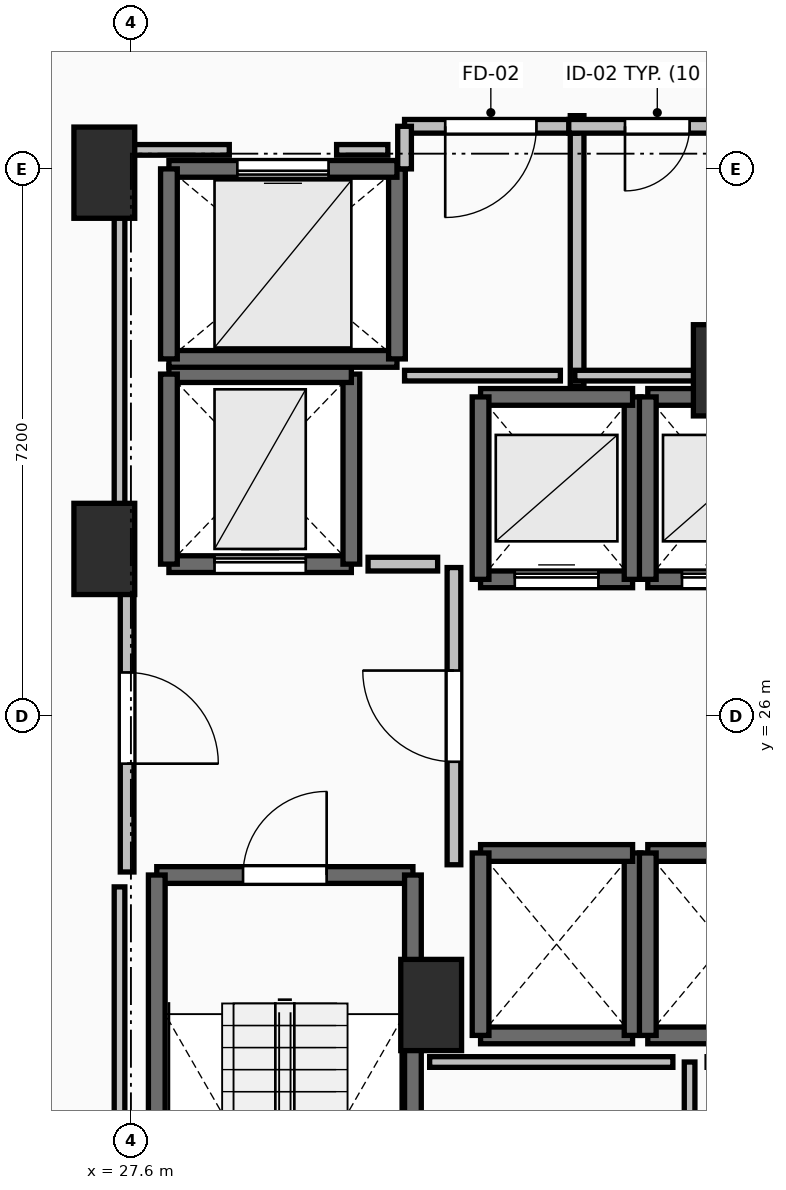
"""IFC4 building model, lengths in metres.
Left out: names, types, materials, properties, quantities, classifications, styles, units other than length and angle.
Written with IfcOpenShell. Run it as: python <this file> out.ifc"""

import sys

from ifc_helpers import new_model, si_unit, direction, frame, frame_2d, origin, origin_2d, place, context, subcontext, project, spatial, rectangle, extrude, element, fill, save


model = new_model("IFC4")
c1 = context("Model", 3, precision=1e-05, world=origin(), true_north=direction((0.0, 1.0)))
c2 = subcontext(c1, "Body", "Model", "MODEL_VIEW")
j1 = project(units=[si_unit("LENGTHUNIT", "METRE"), si_unit("PLANEANGLEUNIT", "RADIAN")], contexts=[c1])
p1 = place(None, origin())
s1 = spatial("IfcSite", under=j1, at=p1, CompositionType="ELEMENT")
p2 = place(p1, origin())
s2 = spatial("IfcBuilding", under=s1, at=p2, CompositionType="ELEMENT")
p3 = place(p2, frame((0.0, 0.0, 41.5)))
s3 = spatial("IfcBuildingStorey", under=s2, at=p3, CompositionType="ELEMENT", Elevation=41.5)
for number, where, z_axis, x_axis in (
    (1, (27.25, 28.2, 0.0), (0.0, 0.0, 1.0), (1.0, 0.0, 0.0)),
    (2, (27.25, 33.15, 0.0), (0.0, 0.0, 1.0), (1.0, 0.0, 0.0)),
    (3, (31.55, 22.2, 0.0), (0.0, 0.0, 1.0), (1.0, 0.0, 0.0)),
    (4, (35.4, 30.55, 0.0), (0.0, 0.0, 1.0), (1.0, 0.0, 0.0)),
):
    element("IfcColumn", number, at=place(p3, frame(where, z_axis=z_axis, x_axis=x_axis)), inside=s3, PredefinedType="PILASTER", context=c2, shape_type="SweptSolid", body=[
        extrude(rectangle(XDim=0.8, YDim=1.2, at=origin_2d()), origin(), (0.0, 0.0, 1.0), 3.5),
    ])
p4 = place(p3, frame((27.94, 23.91, 0.0), z_axis=(0.0, 0.0, 1.0), x_axis=(1.0, 0.0, 0.0)))
e5 = element("IfcWall", 5, at=p4, inside=s3, PredefinedType="SOLIDWALL", context=c2, shape_type="SweptSolid", body=[
    extrude(rectangle(XDim=3.37, YDim=0.22, at=frame_2d((1.685, 0.0))), origin(), (0.0, 0.0, 1.0), 3.24),
])
p5 = place(p4, frame((1.135, 0.0, 0.0)))
e6 = element("IfcOpeningElement", 6, at=p5, cuts=e5, PredefinedType="OPENING", context=c2, shape_type="SweptSolid", body=[
    extrude(rectangle(XDim=1.1, YDim=2.15, at=frame_2d((0.55, 1.075))), frame((0.0, 0.125, 0.0), z_axis=(0.0, -1.0, 0.0), x_axis=(1.0, 0.0, 0.0)), (0.0, 0.0, 1.0), 0.25),
])
for number, where, z_axis, x_axis in (
    (7, (31.31, 23.91, 0.0), (0.0, 0.0, 1.0), (0.0, -1.0, 0.0)),
    (8, (27.94, 16.49, 0.0), (0.0, 0.0, 1.0), (0.0, 1.0, 0.0)),
):
    element("IfcWall", number, at=place(p3, frame(where, z_axis=z_axis, x_axis=x_axis)), inside=s3, PredefinedType="SOLIDWALL", context=c2, shape_type="SweptSolid", body=[
        extrude(rectangle(XDim=7.42, YDim=0.22, at=frame_2d((3.71, 0.0))), origin(), (0.0, 0.0, 1.0), 3.24),
    ])
p6 = place(p3, frame((32.2, 27.8, 0.0), z_axis=(0.0, 0.0, 1.0), x_axis=(1.0, 0.0, 0.0)))
e9 = element("IfcWall", 9, at=p6, inside=s3, PredefinedType="SOLIDWALL", context=c2, shape_type="SweptSolid", body=[
    extrude(rectangle(XDim=2.0, YDim=0.22, at=frame_2d((1.0, 0.0))), origin(), (0.0, 0.0, 1.0), 3.24),
])
p7 = place(p6, frame((0.45, 0.0, 0.0)))
e10 = element("IfcOpeningElement", 10, at=p7, cuts=e9, PredefinedType="OPENING", context=c2, shape_type="SweptSolid", body=[
    extrude(rectangle(XDim=1.1, YDim=2.2, at=frame_2d((0.55, 1.1))), frame((0.0, 0.125, 0.0), z_axis=(0.0, -1.0, 0.0), x_axis=(1.0, 0.0, 0.0)), (0.0, 0.0, 1.0), 0.25),
])
p8 = place(p3, frame((34.2, 27.8, 0.0), z_axis=(0.0, 0.0, 1.0), x_axis=(0.0, 1.0, 0.0)))
e11 = element("IfcWall", 11, at=p8, inside=s3, PredefinedType="SOLIDWALL", context=c2, shape_type="SweptSolid", body=[
    extrude(rectangle(XDim=2.4, YDim=0.22, at=frame_2d((1.2, 0.0))), origin(), (0.0, 0.0, 1.0), 3.24),
])
p9 = place(p3, frame((34.2, 30.2, 0.0), z_axis=(0.0, 0.0, 1.0), x_axis=(-1.0, 0.0, 0.0)))
e12 = element("IfcWall", 12, at=p9, inside=s3, PredefinedType="SOLIDWALL", context=c2, shape_type="SweptSolid", body=[
    extrude(rectangle(XDim=2.0, YDim=0.22, at=frame_2d((1.0, 0.0))), origin(), (0.0, 0.0, 1.0), 3.24),
])
p10 = place(p3, frame((32.2, 30.2, 0.0), z_axis=(0.0, 0.0, 1.0), x_axis=(0.0, -1.0, 0.0)))
e13 = element("IfcWall", 13, at=p10, inside=s3, PredefinedType="SOLIDWALL", context=c2, shape_type="SweptSolid", body=[
    extrude(rectangle(XDim=2.4, YDim=0.22, at=frame_2d((1.2, 0.0))), origin(), (0.0, 0.0, 1.0), 3.24),
])
p11 = place(p3, frame((34.4, 27.8, 0.0), z_axis=(0.0, 0.0, 1.0), x_axis=(1.0, 0.0, 0.0)))
e14 = element("IfcWall", 14, at=p11, inside=s3, PredefinedType="SOLIDWALL", context=c2, shape_type="SweptSolid", body=[
    extrude(rectangle(XDim=2.0, YDim=0.22, at=frame_2d((1.0, 0.0))), origin(), (0.0, 0.0, 1.0), 3.24),
])
p12 = place(p11, frame((0.45, 0.0, 0.0)))
e15 = element("IfcOpeningElement", 15, at=p12, cuts=e14, PredefinedType="OPENING", context=c2, shape_type="SweptSolid", body=[
    extrude(rectangle(XDim=1.1, YDim=2.2, at=frame_2d((0.55, 1.1))), frame((0.0, 0.125, 0.0), z_axis=(0.0, -1.0, 0.0), x_axis=(1.0, 0.0, 0.0)), (0.0, 0.0, 1.0), 0.25),
])
p13 = place(p3, frame((36.4, 30.2, 0.0), z_axis=(0.0, 0.0, 1.0), x_axis=(-1.0, 0.0, 0.0)))
e16 = element("IfcWall", 16, at=p13, inside=s3, PredefinedType="SOLIDWALL", context=c2, shape_type="SweptSolid", body=[
    extrude(rectangle(XDim=2.0, YDim=0.22, at=frame_2d((1.0, 0.0))), origin(), (0.0, 0.0, 1.0), 3.24),
])
p14 = place(p3, frame((34.4, 30.2, 0.0), z_axis=(0.0, 0.0, 1.0), x_axis=(0.0, -1.0, 0.0)))
e17 = element("IfcWall", 17, at=p14, inside=s3, PredefinedType="SOLIDWALL", context=c2, shape_type="SweptSolid", body=[
    extrude(rectangle(XDim=2.4, YDim=0.22, at=frame_2d((1.2, 0.0))), origin(), (0.0, 0.0, 1.0), 3.24),
])
p15 = place(p3, frame((32.2, 21.8, 0.0), z_axis=(0.0, 0.0, 1.0), x_axis=(1.0, 0.0, 0.0)))
e18 = element("IfcWall", 18, at=p15, inside=s3, PredefinedType="SOLIDWALL", context=c2, shape_type="SweptSolid", body=[
    extrude(rectangle(XDim=2.0, YDim=0.22, at=frame_2d((1.0, 0.0))), origin(), (0.0, 0.0, 1.0), 3.24),
])
p16 = place(p3, frame((34.2, 21.8, 0.0), z_axis=(0.0, 0.0, 1.0), x_axis=(0.0, 1.0, 0.0)))
e19 = element("IfcWall", 19, at=p16, inside=s3, PredefinedType="SOLIDWALL", context=c2, shape_type="SweptSolid", body=[
    extrude(rectangle(XDim=2.4, YDim=0.22, at=frame_2d((1.2, 0.0))), origin(), (0.0, 0.0, 1.0), 3.24),
])
p17 = place(p3, frame((34.2, 24.2, 0.0), z_axis=(0.0, 0.0, 1.0), x_axis=(-1.0, 0.0, 0.0)))
e20 = element("IfcWall", 20, at=p17, inside=s3, PredefinedType="SOLIDWALL", context=c2, shape_type="SweptSolid", body=[
    extrude(rectangle(XDim=2.0, YDim=0.22, at=frame_2d((1.0, 0.0))), origin(), (0.0, 0.0, 1.0), 3.24),
])
p18 = place(p3, frame((32.2, 24.2, 0.0), z_axis=(0.0, 0.0, 1.0), x_axis=(0.0, -1.0, 0.0)))
e21 = element("IfcWall", 21, at=p18, inside=s3, PredefinedType="SOLIDWALL", context=c2, shape_type="SweptSolid", body=[
    extrude(rectangle(XDim=2.4, YDim=0.22, at=frame_2d((1.2, 0.0))), origin(), (0.0, 0.0, 1.0), 3.24),
])
for number, where, z_axis, x_axis in (
    (22, (34.4, 21.8, 0.0), (0.0, 0.0, 1.0), (1.0, 0.0, 0.0)),
    (23, (36.4, 24.2, 0.0), (0.0, 0.0, 1.0), (-1.0, 0.0, 0.0)),
):
    element("IfcWall", number, at=place(p3, frame(where, z_axis=z_axis, x_axis=x_axis)), inside=s3, PredefinedType="SOLIDWALL", context=c2, shape_type="SweptSolid", body=[
        extrude(rectangle(XDim=2.0, YDim=0.22, at=frame_2d((1.0, 0.0))), origin(), (0.0, 0.0, 1.0), 3.24),
    ])
p19 = place(p3, frame((34.4, 24.2, 0.0), z_axis=(0.0, 0.0, 1.0), x_axis=(0.0, -1.0, 0.0)))
e24 = element("IfcWall", 24, at=p19, inside=s3, PredefinedType="SOLIDWALL", context=c2, shape_type="SweptSolid", body=[
    extrude(rectangle(XDim=2.4, YDim=0.22, at=frame_2d((1.2, 0.0))), origin(), (0.0, 0.0, 1.0), 3.24),
])
p20 = place(p3, frame((28.1, 28.0, 0.0), z_axis=(0.0, 0.0, 1.0), x_axis=(1.0, 0.0, 0.0)))
e25 = element("IfcWall", 25, at=p20, inside=s3, PredefinedType="SHEAR", context=c2, shape_type="SweptSolid", body=[
    extrude(rectangle(XDim=2.4, YDim=0.22, at=frame_2d((1.2, 0.0))), origin(), (0.0, 0.0, 1.0), 3.24),
])
p21 = place(p20, frame((0.6, 0.0, 0.0)))
e26 = element("IfcOpeningElement", 26, at=p21, cuts=e25, PredefinedType="OPENING", context=c2, shape_type="SweptSolid", body=[
    extrude(rectangle(XDim=1.2, YDim=2.2, at=frame_2d((0.6, 1.1))), frame((0.0, 0.125, 0.0), z_axis=(0.0, -1.0, 0.0), x_axis=(1.0, 0.0, 0.0)), (0.0, 0.0, 1.0), 0.25),
])
p22 = place(p3, frame((30.5, 28.0, 0.0), z_axis=(0.0, 0.0, 1.0), x_axis=(0.0, 1.0, 0.0)))
e27 = element("IfcWall", 27, at=p22, inside=s3, PredefinedType="SHEAR", context=c2, shape_type="SweptSolid", body=[
    extrude(rectangle(XDim=2.5, YDim=0.22, at=frame_2d((1.25, 0.0))), origin(), (0.0, 0.0, 1.0), 3.24),
])
p23 = place(p3, frame((30.5, 30.5, 0.0), z_axis=(0.0, 0.0, 1.0), x_axis=(-1.0, 0.0, 0.0)))
e28 = element("IfcWall", 28, at=p23, inside=s3, PredefinedType="SHEAR", context=c2, shape_type="SweptSolid", body=[
    extrude(rectangle(XDim=2.4, YDim=0.22, at=frame_2d((1.2, 0.0))), origin(), (0.0, 0.0, 1.0), 3.24),
])
p24 = place(p3, frame((28.1, 30.5, 0.0), z_axis=(0.0, 0.0, 1.0), x_axis=(0.0, -1.0, 0.0)))
e29 = element("IfcWall", 29, at=p24, inside=s3, PredefinedType="SHEAR", context=c2, shape_type="SweptSolid", body=[
    extrude(rectangle(XDim=2.5, YDim=0.22, at=frame_2d((1.25, 0.0))), origin(), (0.0, 0.0, 1.0), 3.24),
])
p25 = place(p3, frame((28.1, 30.7, 0.0), z_axis=(0.0, 0.0, 1.0), x_axis=(1.0, 0.0, 0.0)))
e30 = element("IfcWall", 30, at=p25, inside=s3, PredefinedType="SOLIDWALL", context=c2, shape_type="SweptSolid", body=[
    extrude(rectangle(XDim=3.0, YDim=0.22, at=frame_2d((1.5, 0.0))), origin(), (0.0, 0.0, 1.0), 3.24),
])
p26 = place(p3, frame((31.1, 30.7, 0.0), z_axis=(0.0, 0.0, 1.0), x_axis=(0.0, 1.0, 0.0)))
e31 = element("IfcWall", 31, at=p26, inside=s3, PredefinedType="SOLIDWALL", context=c2, shape_type="SweptSolid", body=[
    extrude(rectangle(XDim=2.5, YDim=0.22, at=frame_2d((1.25, 0.0))), origin(), (0.0, 0.0, 1.0), 3.24),
])
p27 = place(p3, frame((31.1, 33.2, 0.0), z_axis=(0.0, 0.0, 1.0), x_axis=(-1.0, 0.0, 0.0)))
e32 = element("IfcWall", 32, at=p27, inside=s3, PredefinedType="SOLIDWALL", context=c2, shape_type="SweptSolid", body=[
    extrude(rectangle(XDim=3.0, YDim=0.22, at=frame_2d((1.5, 0.0))), origin(), (0.0, 0.0, 1.0), 3.24),
])
p28 = place(p27, frame((0.9, 0.0, 0.0)))
e33 = element("IfcOpeningElement", 33, at=p28, cuts=e32, PredefinedType="OPENING", context=c2, shape_type="SweptSolid", body=[
    extrude(rectangle(XDim=1.2, YDim=2.2, at=frame_2d((0.6, 1.1))), frame((0.0, 0.125, 0.0), z_axis=(0.0, -1.0, 0.0), x_axis=(1.0, 0.0, 0.0)), (0.0, 0.0, 1.0), 0.25),
])
p29 = place(p3, frame((28.1, 33.2, 0.0), z_axis=(0.0, 0.0, 1.0), x_axis=(0.0, -1.0, 0.0)))
e34 = element("IfcWall", 34, at=p29, inside=s3, PredefinedType="SOLIDWALL", context=c2, shape_type="SweptSolid", body=[
    extrude(rectangle(XDim=2.5, YDim=0.22, at=frame_2d((1.25, 0.0))), origin(), (0.0, 0.0, 1.0), 3.24),
])
p30 = place(p3, frame((31.85, 24.045, 0.0), z_axis=(0.0, 0.0, 1.0), x_axis=(0.0, 1.0, 0.0)))
e35 = element("IfcWall", 35, at=p30, inside=s3, PredefinedType="PARTITIONING", context=c2, shape_type="SweptSolid", body=[
    extrude(rectangle(XDim=3.91, YDim=0.18, at=frame_2d((1.955, 0.0))), origin(), (0.0, 0.0, 1.0), 3.24),
])
p31 = place(p30, frame((1.355, 0.0, 0.0)))
e36 = element("IfcOpeningElement", 36, at=p31, cuts=e35, PredefinedType="OPENING", context=c2, shape_type="SweptSolid", body=[
    extrude(rectangle(XDim=1.2, YDim=2.15, at=frame_2d((0.6, 1.075))), frame((0.0, 0.105, 0.0), z_axis=(0.0, -1.0, 0.0), x_axis=(1.0, 0.0, 0.0)), (0.0, 0.0, 1.0), 0.21),
])
p32 = place(p3, frame((27.55, 28.0, 0.0), z_axis=(0.0, 0.0, 1.0), x_axis=(0.0, -1.0, 0.0)))
e37 = element("IfcWall", 37, at=p32, inside=s3, PredefinedType="PARTITIONING", context=c2, shape_type="SweptSolid", body=[
    extrude(rectangle(XDim=4.05, YDim=0.18, at=frame_2d((2.025, 0.0))), origin(), (0.0, 0.0, 1.0), 3.24),
])
p33 = place(p32, frame((1.425, 0.0, 0.0)))
e38 = element("IfcOpeningElement", 38, at=p33, cuts=e37, PredefinedType="OPENING", context=c2, shape_type="SweptSolid", body=[
    extrude(rectangle(XDim=1.2, YDim=2.15, at=frame_2d((0.6, 1.075))), frame((0.0, 0.105, 0.0), z_axis=(0.0, -1.0, 0.0), x_axis=(1.0, 0.0, 0.0)), (0.0, 0.0, 1.0), 0.21),
])
p34 = place(p3, frame((33.47, 30.34, 0.0), z_axis=(0.0, 0.0, 1.0), x_axis=(0.0, 1.0, 0.0)))
e39 = element("IfcWall", 39, at=p34, inside=s3, PredefinedType="PARTITIONING", context=c2, shape_type="SweptSolid", body=[
    extrude(rectangle(XDim=3.56, YDim=0.18, at=frame_2d((1.78, 0.0))), origin(), (0.0, 0.0, 1.0), 3.24),
])
p35 = place(p3, frame((33.47, 33.76, 0.0), z_axis=(0.0, 0.0, 1.0), x_axis=(-1.0, 0.0, 0.0)))
e40 = element("IfcWall", 40, at=p35, inside=s3, PredefinedType="PARTITIONING", context=c2, shape_type="SweptSolid", body=[
    extrude(rectangle(XDim=2.27, YDim=0.18, at=frame_2d((1.135, 0.0))), origin(), (0.0, 0.0, 1.0), 3.24),
])
p36 = place(p35, frame((0.535, 0.0, 0.0)))
e41 = element("IfcOpeningElement", 41, at=p36, cuts=e40, PredefinedType="OPENING", context=c2, shape_type="SweptSolid", body=[
    extrude(rectangle(XDim=1.2, YDim=2.15, at=frame_2d((0.6, 1.075))), frame((0.0, 0.105, 0.0), z_axis=(0.0, -1.0, 0.0), x_axis=(1.0, 0.0, 0.0)), (0.0, 0.0, 1.0), 0.21),
])
p37 = place(p3, frame((31.2, 33.76, 0.0), z_axis=(0.0, 0.0, 1.0), x_axis=(0.0, -1.0, 0.0)))
e42 = element("IfcWall", 42, at=p37, inside=s3, PredefinedType="PARTITIONING", context=c2, shape_type="SweptSolid", body=[
    extrude(rectangle(XDim=0.56, YDim=0.18, at=frame_2d((0.28, 0.0))), origin(), (0.0, 0.0, 1.0), 3.24),
])
p38 = place(p3, frame((35.69, 33.76, 0.0), z_axis=(0.0, 0.0, 1.0), x_axis=(-1.0, 0.0, 0.0)))
e43 = element("IfcWall", 43, at=p38, inside=s3, PredefinedType="PARTITIONING", context=c2, shape_type="SweptSolid", body=[
    extrude(rectangle(XDim=2.33, YDim=0.18, at=frame_2d((1.165, 0.0))), origin(), (0.0, 0.0, 1.0), 3.24),
])
p39 = place(p38, frame((0.74, 0.0, 0.0)))
e44 = element("IfcOpeningElement", 44, at=p39, cuts=e43, PredefinedType="OPENING", context=c2, shape_type="SweptSolid", body=[
    extrude(rectangle(XDim=0.85, YDim=2.1, at=frame_2d((0.425, 1.05))), frame((0.0, 0.105, 0.0), z_axis=(0.0, -1.0, 0.0), x_axis=(1.0, 0.0, 0.0)), (0.0, 0.0, 1.0), 0.21),
])
p40 = place(p3, frame((34.95, 16.32, 0.0), z_axis=(0.0, 0.0, 1.0), x_axis=(0.0, 1.0, 0.0)))
e45 = element("IfcWall", 45, at=p40, inside=s3, PredefinedType="PARTITIONING", context=c2, shape_type="SweptSolid", body=[
    extrude(rectangle(XDim=5.13, YDim=0.14, at=frame_2d((2.565, 0.0))), origin(), (0.0, 0.0, 1.0), 3.24),
])
p41 = place(p3, frame((31.635, 28.0, 0.0), z_axis=(0.0, 0.0, 1.0), x_axis=(-1.0, 0.0, 0.0)))
e46 = element("IfcWall", 46, at=p41, inside=s3, PredefinedType="PARTITIONING", context=c2, shape_type="SweptSolid", body=[
    extrude(rectangle(XDim=0.915, YDim=0.18, at=frame_2d((0.458, 0.0))), origin(), (0.0, 0.0, 1.0), 3.24),
])
p42 = place(p3, frame((31.2, 30.48, 0.0), z_axis=(0.0, 0.0, 1.0), x_axis=(1.0, 0.0, 0.0)))
e47 = element("IfcWall", 47, at=p42, inside=s3, PredefinedType="PARTITIONING", context=c2, shape_type="SweptSolid", body=[
    extrude(rectangle(XDim=2.05, YDim=0.14, at=frame_2d((1.025, 0.0))), origin(), (0.0, 0.0, 1.0), 3.24),
])
p43 = place(p3, frame((33.44, 30.48, 0.0), z_axis=(0.0, 0.0, 1.0), x_axis=(1.0, 0.0, 0.0)))
e48 = element("IfcWall", 48, at=p43, inside=s3, PredefinedType="PARTITIONING", context=c2, shape_type="SweptSolid", body=[
    extrude(rectangle(XDim=2.14, YDim=0.14, at=frame_2d((1.07, 0.0))), origin(), (0.0, 0.0, 1.0), 2.432),
])
p44 = place(p3, frame((34.73, 21.45, 0.0), z_axis=(0.0, 0.0, 1.0), x_axis=(-1.0, 0.0, 0.0)))
e49 = element("IfcWall", 49, at=p44, inside=s3, PredefinedType="PARTITIONING", context=c2, shape_type="SweptSolid", body=[
    extrude(rectangle(XDim=3.2, YDim=0.14, at=frame_2d((1.6, 0.0))), origin(), (0.0, 0.0, 1.0), 3.24),
])
p45 = place(p3, frame((27.45, 16.24, 0.0), z_axis=(0.0, 0.0, 1.0), x_axis=(0.0, 1.0, 0.0)))
e50 = element("IfcWall", 50, at=p45, inside=s3, PredefinedType="PARTITIONING", context=c2, shape_type="SweptSolid", body=[
    extrude(rectangle(XDim=7.514, YDim=0.14, at=frame_2d((3.757, 0.0))), origin(), (0.0, 0.0, 1.0), 2.432),
])
p46 = place(p3, frame((27.45, 28.196, 0.0), z_axis=(0.0, 0.0, 1.0), x_axis=(0.0, 1.0, 0.0)))
e51 = element("IfcWall", 51, at=p46, inside=s3, PredefinedType="PARTITIONING", context=c2, shape_type="SweptSolid", body=[
    extrude(rectangle(XDim=5.254, YDim=0.14, at=frame_2d((2.627, 0.0))), origin(), (0.0, 0.0, 1.0), 2.432),
])
p47 = place(p3, frame((27.45, 33.45, 0.0), z_axis=(0.0, 0.0, 1.0), x_axis=(1.0, 0.0, 0.0)))
e52 = element("IfcWall", 52, at=p47, inside=s3, PredefinedType="PARTITIONING", context=c2, shape_type="SweptSolid", body=[
    extrude(rectangle(XDim=1.444, YDim=0.14, at=frame_2d((0.722, 0.0))), origin(), (0.0, 0.0, 1.0), 2.432),
])
p48 = place(p3, frame((30.306, 33.45, 0.0), z_axis=(0.0, 0.0, 1.0), x_axis=(1.0, 0.0, 0.0)))
e53 = element("IfcWall", 53, at=p48, inside=s3, PredefinedType="PARTITIONING", context=c2, shape_type="SweptSolid", body=[
    extrude(rectangle(XDim=0.674, YDim=0.14, at=frame_2d((0.337, 0.0))), origin(), (0.0, 0.0, 1.0), 3.24),
])
p49 = place(p5, origin())
e54 = element("IfcDoor", 54, at=p49, inside=s3, OperationType="SINGLE_SWING_RIGHT", PredefinedType="DOOR", context=c2, shape_type="SweptSolid", body=[
    extrude(rectangle(XDim=1.1, YDim=2.15, at=frame_2d((0.55, 1.075))), frame((0.0, 0.025, 0.0), z_axis=(0.0, -1.0, 0.0), x_axis=(1.0, 0.0, 0.0)), (0.0, 0.0, 1.0), 0.05),
])
fill(e6, e54)
p50 = place(p7, origin())
e55 = element("IfcDoor", 55, at=p50, inside=s3, OperationType="SLIDING_TO_LEFT", PredefinedType="DOOR", context=c2, shape_type="SweptSolid", body=[
    extrude(rectangle(XDim=1.1, YDim=2.2, at=frame_2d((0.55, 1.1))), frame((0.0, 0.025, 0.0), z_axis=(0.0, -1.0, 0.0), x_axis=(1.0, 0.0, 0.0)), (0.0, 0.0, 1.0), 0.05),
])
fill(e10, e55)
p51 = place(p12, origin())
e56 = element("IfcDoor", 56, at=p51, inside=s3, OperationType="SLIDING_TO_LEFT", PredefinedType="DOOR", context=c2, shape_type="SweptSolid", body=[
    extrude(rectangle(XDim=1.1, YDim=2.2, at=frame_2d((0.55, 1.1))), frame((0.0, 0.025, 0.0), z_axis=(0.0, -1.0, 0.0), x_axis=(1.0, 0.0, 0.0)), (0.0, 0.0, 1.0), 0.05),
])
fill(e15, e56)
p52 = place(p21, origin())
e57 = element("IfcDoor", 57, at=p52, inside=s3, OperationType="SLIDING_TO_LEFT", PredefinedType="DOOR", context=c2, shape_type="SweptSolid", body=[
    extrude(rectangle(XDim=1.2, YDim=2.2, at=frame_2d((0.6, 1.1))), frame((0.0, 0.025, 0.0), z_axis=(0.0, -1.0, 0.0), x_axis=(1.0, 0.0, 0.0)), (0.0, 0.0, 1.0), 0.05),
])
fill(e26, e57)
p53 = place(p28, origin())
e58 = element("IfcDoor", 58, at=p53, inside=s3, OperationType="SLIDING_TO_LEFT", PredefinedType="DOOR", context=c2, shape_type="SweptSolid", body=[
    extrude(rectangle(XDim=1.2, YDim=2.2, at=frame_2d((0.6, 1.1))), frame((0.0, 0.025, 0.0), z_axis=(0.0, -1.0, 0.0), x_axis=(1.0, 0.0, 0.0)), (0.0, 0.0, 1.0), 0.05),
])
fill(e33, e58)
p54 = place(p31, origin())
e59 = element("IfcDoor", 59, at=p54, inside=s3, OperationType="SINGLE_SWING_RIGHT", PredefinedType="DOOR", context=c2, shape_type="SweptSolid", body=[
    extrude(rectangle(XDim=1.2, YDim=2.15, at=frame_2d((0.6, 1.075))), frame((0.0, 0.025, 0.0), z_axis=(0.0, -1.0, 0.0), x_axis=(1.0, 0.0, 0.0)), (0.0, 0.0, 1.0), 0.05),
])
fill(e36, e59)
p55 = place(p33, origin())
e60 = element("IfcDoor", 60, at=p55, inside=s3, OperationType="SINGLE_SWING_RIGHT", PredefinedType="DOOR", context=c2, shape_type="SweptSolid", body=[
    extrude(rectangle(XDim=1.2, YDim=2.15, at=frame_2d((0.6, 1.075))), frame((0.0, 0.025, 0.0), z_axis=(0.0, -1.0, 0.0), x_axis=(1.0, 0.0, 0.0)), (0.0, 0.0, 1.0), 0.05),
])
fill(e38, e60)
p56 = place(p36, origin())
e61 = element("IfcDoor", 61, at=p56, inside=s3, OperationType="SINGLE_SWING_RIGHT", PredefinedType="DOOR", context=c2, shape_type="SweptSolid", body=[
    extrude(rectangle(XDim=1.2, YDim=2.15, at=frame_2d((0.6, 1.075))), frame((0.0, 0.025, 0.0), z_axis=(0.0, -1.0, 0.0), x_axis=(1.0, 0.0, 0.0)), (0.0, 0.0, 1.0), 0.05),
])
fill(e41, e61)
p57 = place(p39, origin())
e62 = element("IfcDoor", 62, at=p57, inside=s3, OperationType="SINGLE_SWING_RIGHT", PredefinedType="DOOR", context=c2, shape_type="SweptSolid", body=[
    extrude(rectangle(XDim=0.85, YDim=2.1, at=frame_2d((0.425, 1.05))), frame((0.0, 0.025, 0.0), z_axis=(0.0, -1.0, 0.0), x_axis=(1.0, 0.0, 0.0)), (0.0, 0.0, 1.0), 0.05),
])
fill(e44, e62)
save(model, sys.argv[1])
